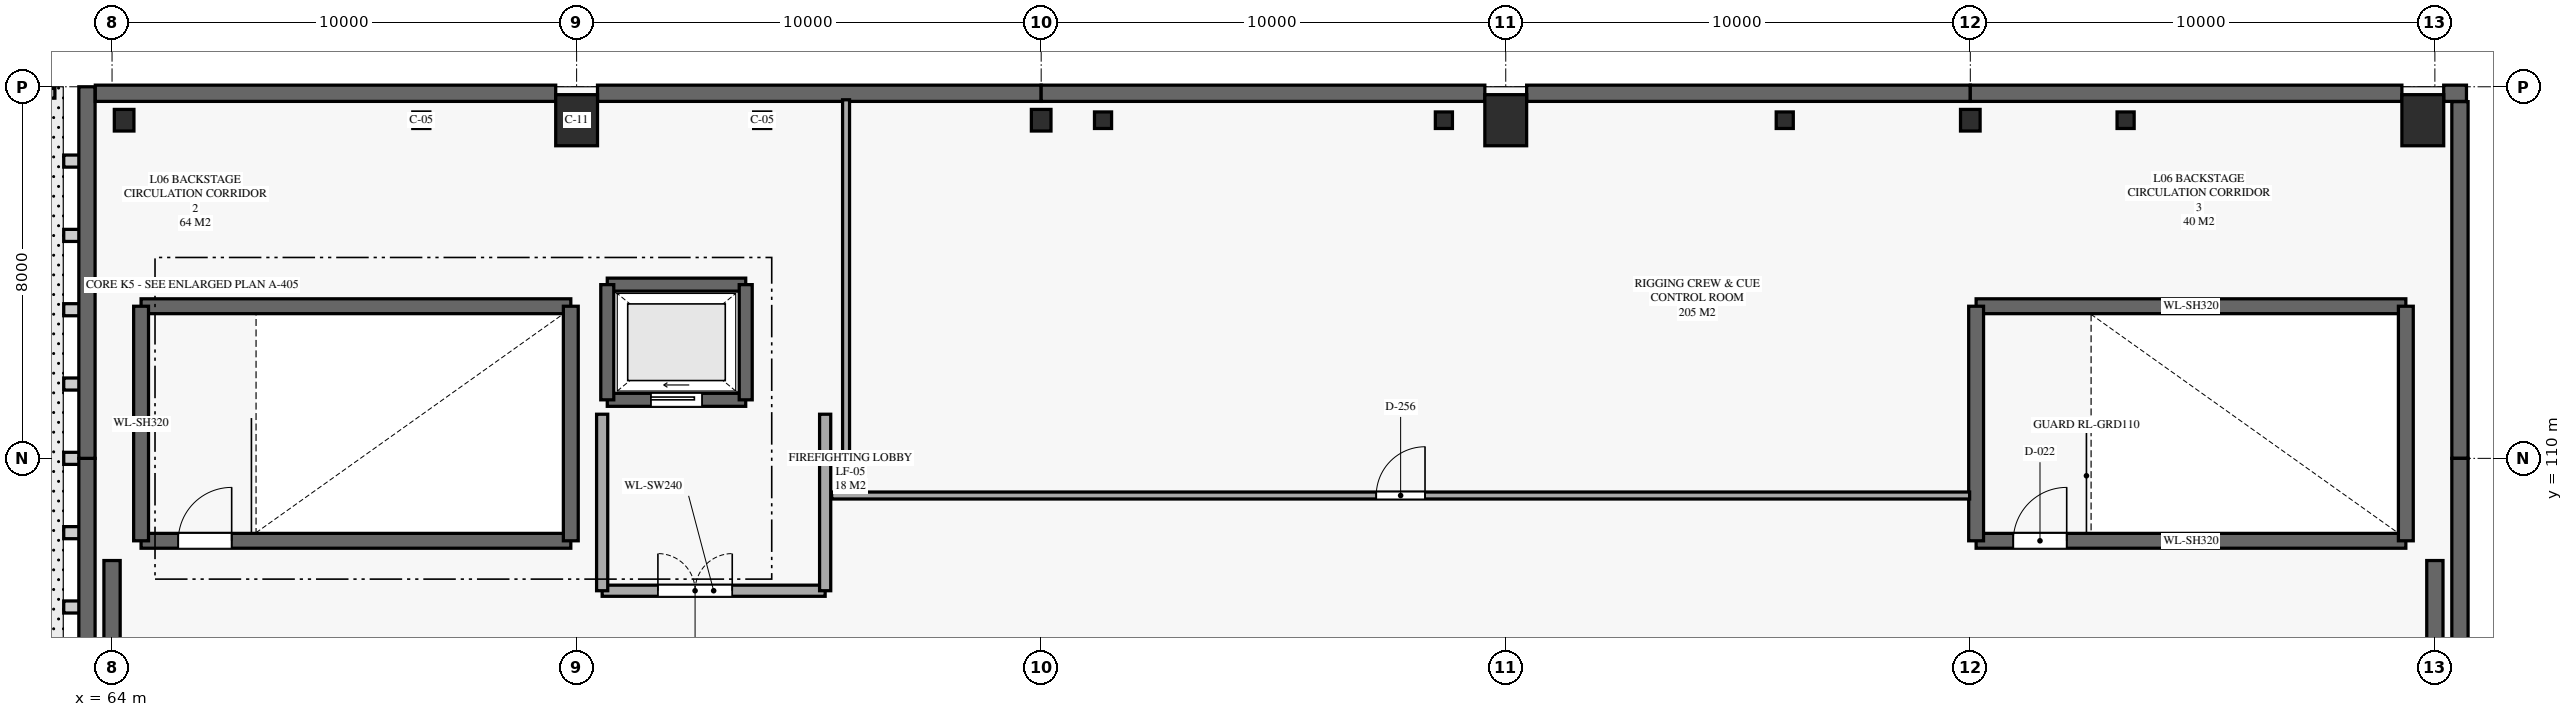
"""IFC4 building model, lengths in metres.
Left out: names, types, materials, properties, quantities, classifications, styles, units other than length and angle.
Written with IfcOpenShell. Run it as: python <this file> out.ifc"""

import sys

from ifc_helpers import new_model, si_unit, direction, frame, frame_2d, origin, origin_2d, place, context, subcontext, project, spatial, rectangle, i_section, extrude, element, fill, save


model = new_model("IFC4")
c1 = context("Model", 3, precision=1e-05, world=origin(), true_north=direction((0.0, 1.0)))
c2 = subcontext(c1, "Body", "Model", "MODEL_VIEW")
j1 = project(units=[si_unit("LENGTHUNIT", "METRE"), si_unit("PLANEANGLEUNIT", "RADIAN")], contexts=[c1])
p1 = place(None, origin())
s1 = spatial("IfcSite", under=j1, at=p1, CompositionType="ELEMENT")
p2 = place(p1, origin())
s2 = spatial("IfcBuilding", under=s1, at=p2, CompositionType="ELEMENT")
p3 = place(p2, frame((0.0, 0.0, 29.6)))
s3 = spatial("IfcBuildingStorey", under=s2, at=p3, CompositionType="ELEMENT", Elevation=29.6)
p4 = place(p3, frame((64.26, 117.28, 0.0), z_axis=(0.0, 0.0, 1.0), x_axis=(1.0, 0.0, 0.0)))
e1 = element("IfcColumn", 1, at=p4, inside=s3, PredefinedType="COLUMN", context=c2, shape_type="SweptSolid", body=[
    extrude(i_section(OverallWidth=0.422, OverallDepth=0.465, WebThickness=0.045, FlangeThickness=0.073, FilletRadius=0.02, at=origin_2d()), origin(), (0.0, 0.0, 1.0), 3.68),
])
p5 = place(p3, frame((74.0, 117.28, 0.0), z_axis=(0.0, 0.0, 1.0), x_axis=(1.0, 0.0, 0.0)))
e2 = element("IfcColumn", 2, at=p5, inside=s3, PredefinedType="COLUMN", context=c2, shape_type="SweptSolid", body=[
    extrude(rectangle(XDim=0.9, YDim=1.1, at=origin_2d()), origin(), (0.0, 0.0, 1.0), 4.6),
])
p6 = place(p3, frame((84.0, 117.28, 0.0), z_axis=(0.0, 0.0, 1.0), x_axis=(1.0, 0.0, 0.0)))
e3 = element("IfcColumn", 3, at=p6, inside=s3, PredefinedType="COLUMN", context=c2, shape_type="SweptSolid", body=[
    extrude(i_section(OverallWidth=0.422, OverallDepth=0.465, WebThickness=0.045, FlangeThickness=0.073, FilletRadius=0.02, at=origin_2d()), origin(), (0.0, 0.0, 1.0), 4.6),
])
p7 = place(p3, frame((94.0, 117.28, 0.0), z_axis=(0.0, 0.0, 1.0), x_axis=(1.0, 0.0, 0.0)))
e4 = element("IfcColumn", 4, at=p7, inside=s3, PredefinedType="COLUMN", context=c2, shape_type="SweptSolid", body=[
    extrude(rectangle(XDim=0.9, YDim=1.1, at=origin_2d()), origin(), (0.0, 0.0, 1.0), 4.6),
])
p8 = place(p3, frame((104.0, 117.28, 0.0), z_axis=(0.0, 0.0, 1.0), x_axis=(1.0, 0.0, 0.0)))
e5 = element("IfcColumn", 5, at=p8, inside=s3, PredefinedType="COLUMN", context=c2, shape_type="SweptSolid", body=[
    extrude(i_section(OverallWidth=0.422, OverallDepth=0.465, WebThickness=0.045, FlangeThickness=0.073, FilletRadius=0.02, at=origin_2d()), origin(), (0.0, 0.0, 1.0), 4.6),
])
p9 = place(p3, frame((113.74, 117.28, 0.0), z_axis=(0.0, 0.0, 1.0), x_axis=(1.0, 0.0, 0.0)))
e6 = element("IfcColumn", 6, at=p9, inside=s3, PredefinedType="COLUMN", context=c2, shape_type="SweptSolid", body=[
    extrude(rectangle(XDim=0.9, YDim=1.1, at=origin_2d()), origin(), (0.0, 0.0, 1.0), 4.25),
])
p10 = place(p3, frame((70.657, 117.28, 2.5), z_axis=(0.0, 0.0, 1.0), x_axis=(1.0, 0.0, 0.0)))
e7 = element("IfcColumn", 7, at=p10, inside=s3, PredefinedType="COLUMN", context=c2, shape_type="SweptSolid", body=[
    extrude(i_section(OverallWidth=0.368, OverallDepth=0.356, WebThickness=0.011, FlangeThickness=0.018, FilletRadius=0.015, at=origin_2d()), origin(), (0.0, 0.0, 1.0), 1.756),
])
p11 = place(p3, frame((77.994, 117.28, 2.5), z_axis=(0.0, 0.0, 1.0), x_axis=(1.0, 0.0, 0.0)))
e8 = element("IfcColumn", 8, at=p11, inside=s3, PredefinedType="COLUMN", context=c2, shape_type="SweptSolid", body=[
    extrude(i_section(OverallWidth=0.368, OverallDepth=0.356, WebThickness=0.011, FlangeThickness=0.018, FilletRadius=0.015, at=origin_2d()), origin(), (0.0, 0.0, 1.0), 1.187),
])
p12 = place(p3, frame((85.332, 117.28, 2.5), z_axis=(0.0, 0.0, 1.0), x_axis=(1.0, 0.0, 0.0)))
e9 = element("IfcColumn", 9, at=p12, inside=s3, PredefinedType="COLUMN", context=c2, shape_type="SweptSolid", body=[
    extrude(i_section(OverallWidth=0.368, OverallDepth=0.356, WebThickness=0.011, FlangeThickness=0.018, FilletRadius=0.015, at=origin_2d()), origin(), (0.0, 0.0, 1.0), 1.756),
])
p13 = place(p3, frame((92.668, 117.28, 2.5), z_axis=(0.0, 0.0, 1.0), x_axis=(1.0, 0.0, 0.0)))
e10 = element("IfcColumn", 10, at=p13, inside=s3, PredefinedType="COLUMN", context=c2, shape_type="SweptSolid", body=[
    extrude(i_section(OverallWidth=0.368, OverallDepth=0.356, WebThickness=0.011, FlangeThickness=0.018, FilletRadius=0.015, at=origin_2d()), origin(), (0.0, 0.0, 1.0), 1.187),
])
p14 = place(p3, frame((100.006, 117.28, 2.5), z_axis=(0.0, 0.0, 1.0), x_axis=(1.0, 0.0, 0.0)))
e11 = element("IfcColumn", 11, at=p14, inside=s3, PredefinedType="COLUMN", context=c2, shape_type="SweptSolid", body=[
    extrude(i_section(OverallWidth=0.368, OverallDepth=0.356, WebThickness=0.011, FlangeThickness=0.018, FilletRadius=0.015, at=origin_2d()), origin(), (0.0, 0.0, 1.0), 1.756),
])
p15 = place(p3, frame((107.343, 117.28, 2.5), z_axis=(0.0, 0.0, 1.0), x_axis=(1.0, 0.0, 0.0)))
e12 = element("IfcColumn", 12, at=p15, inside=s3, PredefinedType="COLUMN", context=c2, shape_type="SweptSolid", body=[
    extrude(i_section(OverallWidth=0.368, OverallDepth=0.356, WebThickness=0.011, FlangeThickness=0.018, FilletRadius=0.015, at=origin_2d()), origin(), (0.0, 0.0, 1.0), 1.187),
])
p16 = place(p3, frame((64.625, 108.225, 0.0), z_axis=(0.0, 0.0, 1.0), x_axis=(1.0, 0.0, 0.0)))
e13 = element("IfcWall", 13, at=p16, inside=s3, PredefinedType="SHEAR", context=c2, shape_type="SweptSolid", body=[
    extrude(rectangle(XDim=9.25, YDim=0.32, at=frame_2d((4.625, 0.0))), origin(), (0.0, 0.0, 1.0), 4.35),
])
p17 = place(p16, frame((0.8, 0.0, 0.0)))
e14 = element("IfcOpeningElement", 14, at=p17, cuts=e13, PredefinedType="OPENING", context=c2, shape_type="SweptSolid", body=[
    extrude(rectangle(XDim=1.15, YDim=2.2, at=frame_2d((0.575, 1.1))), frame((0.0, 0.17, 0.0), z_axis=(0.0, -1.0, 0.0), x_axis=(1.0, 0.0, 0.0)), (0.0, 0.0, 1.0), 0.34),
])
p18 = place(p3, frame((73.875, 113.275, 0.0), z_axis=(0.0, 0.0, 1.0), x_axis=(-1.0, 0.0, 0.0)))
e15 = element("IfcWall", 15, at=p18, inside=s3, PredefinedType="SHEAR", context=c2, shape_type="SweptSolid", body=[
    extrude(rectangle(XDim=9.25, YDim=0.32, at=frame_2d((4.625, 0.0))), origin(), (0.0, 0.0, 1.0), 4.35),
])
p19 = place(p3, frame((64.625, 113.275, 0.0), z_axis=(0.0, 0.0, 1.0), x_axis=(0.0, -1.0, 0.0)))
e16 = element("IfcWall", 16, at=p19, inside=s3, PredefinedType="SHEAR", context=c2, shape_type="SweptSolid", body=[
    extrude(rectangle(XDim=5.05, YDim=0.32, at=frame_2d((2.525, 0.0))), origin(), (0.0, 0.0, 1.0), 4.35),
])
p20 = place(p3, frame((73.875, 108.225, 0.0), z_axis=(0.0, 0.0, 1.0), x_axis=(0.0, 1.0, 0.0)))
e17 = element("IfcWall", 17, at=p20, inside=s3, PredefinedType="SHEAR", context=c2, shape_type="SweptSolid", body=[
    extrude(rectangle(XDim=5.05, YDim=0.32, at=frame_2d((2.525, 0.0))), origin(), (0.0, 0.0, 1.0), 4.38),
])
p21 = place(p3, frame((104.125, 108.225, 0.0), z_axis=(0.0, 0.0, 1.0), x_axis=(1.0, 0.0, 0.0)))
e18 = element("IfcWall", 18, at=p21, inside=s3, PredefinedType="SHEAR", context=c2, shape_type="SweptSolid", body=[
    extrude(rectangle(XDim=9.25, YDim=0.32, at=frame_2d((4.625, 0.0))), origin(), (0.0, 0.0, 1.0), 4.35),
])
p22 = place(p21, frame((0.8, 0.0, 0.0)))
e19 = element("IfcOpeningElement", 19, at=p22, cuts=e18, PredefinedType="OPENING", context=c2, shape_type="SweptSolid", body=[
    extrude(rectangle(XDim=1.15, YDim=2.2, at=frame_2d((0.575, 1.1))), frame((0.0, 0.17, 0.0), z_axis=(0.0, -1.0, 0.0), x_axis=(1.0, 0.0, 0.0)), (0.0, 0.0, 1.0), 0.34),
])
p23 = place(p3, frame((113.375, 113.275, 0.0), z_axis=(0.0, 0.0, 1.0), x_axis=(-1.0, 0.0, 0.0)))
e20 = element("IfcWall", 20, at=p23, inside=s3, PredefinedType="SHEAR", context=c2, shape_type="SweptSolid", body=[
    extrude(rectangle(XDim=9.25, YDim=0.32, at=frame_2d((4.625, 0.0))), origin(), (0.0, 0.0, 1.0), 4.35),
])
p24 = place(p3, frame((104.125, 113.275, 0.0), z_axis=(0.0, 0.0, 1.0), x_axis=(0.0, -1.0, 0.0)))
e21 = element("IfcWall", 21, at=p24, inside=s3, PredefinedType="SHEAR", context=c2, shape_type="SweptSolid", body=[
    extrude(rectangle(XDim=5.05, YDim=0.32, at=frame_2d((2.525, 0.0))), origin(), (0.0, 0.0, 1.0), 4.38),
])
p25 = place(p3, frame((113.375, 108.225, 0.0), z_axis=(0.0, 0.0, 1.0), x_axis=(0.0, 1.0, 0.0)))
e22 = element("IfcWall", 22, at=p25, inside=s3, PredefinedType="SHEAR", context=c2, shape_type="SweptSolid", body=[
    extrude(rectangle(XDim=5.05, YDim=0.32, at=frame_2d((2.525, 0.0))), origin(), (0.0, 0.0, 1.0), 4.35),
])
p26 = place(p3, frame((74.66, 111.26, 0.0), z_axis=(0.0, 0.0, 1.0), x_axis=(1.0, 0.0, 0.0)))
e23 = element("IfcWall", 23, at=p26, inside=s3, PredefinedType="SHEAR", context=c2, shape_type="SweptSolid", body=[
    extrude(rectangle(XDim=2.98, YDim=0.28, at=frame_2d((1.49, 0.0))), origin(), (0.0, 0.0, 1.0), 4.38),
])
p27 = place(p26, frame((0.94, 0.0, 0.0)))
e24 = element("IfcOpeningElement", 24, at=p27, cuts=e23, PredefinedType="OPENING", context=c2, shape_type="SweptSolid", body=[
    extrude(rectangle(XDim=1.1, YDim=2.2, at=frame_2d((0.55, 1.1))), frame((0.0, 0.15, 0.0), z_axis=(0.0, -1.0, 0.0), x_axis=(1.0, 0.0, 0.0)), (0.0, 0.0, 1.0), 0.3),
])
p28 = place(p3, frame((77.64, 113.74, 0.0), z_axis=(0.0, 0.0, 1.0), x_axis=(-1.0, 0.0, 0.0)))
e25 = element("IfcWall", 25, at=p28, inside=s3, PredefinedType="SHEAR", context=c2, shape_type="SweptSolid", body=[
    extrude(rectangle(XDim=2.98, YDim=0.28, at=frame_2d((1.49, 0.0))), origin(), (0.0, 0.0, 1.0), 4.38),
])
for number, where, z_axis, x_axis in (
    (26, (74.66, 113.74, 0.0), (0.0, 0.0, 1.0), (0.0, -1.0, 0.0)),
    (27, (77.64, 111.26, 0.0), (0.0, 0.0, 1.0), (0.0, 1.0, 0.0)),
):
    element("IfcWall", number, at=place(p3, frame(where, z_axis=z_axis, x_axis=x_axis)), inside=s3, PredefinedType="SHEAR", context=c2, shape_type="SweptSolid", body=[
        extrude(rectangle(XDim=2.48, YDim=0.28, at=frame_2d((1.24, 0.0))), origin(), (0.0, 0.0, 1.0), 4.38),
    ])
p29 = place(p3, frame((74.55, 107.15, 0.0), z_axis=(0.0, 0.0, 1.0), x_axis=(1.0, 0.0, 0.0)))
e28 = element("IfcWall", 28, at=p29, inside=s3, PredefinedType="SOLIDWALL", context=c2, shape_type="SweptSolid", body=[
    extrude(rectangle(XDim=4.8, YDim=0.24, at=frame_2d((2.4, 0.0))), origin(), (0.0, 0.0, 1.0), 4.35),
])
p30 = place(p29, frame((1.2, 0.0, 0.0)))
e29 = element("IfcOpeningElement", 29, at=p30, cuts=e28, PredefinedType="OPENING", context=c2, shape_type="SweptSolid", body=[
    extrude(rectangle(XDim=1.6, YDim=2.2, at=frame_2d((0.8, 1.1))), frame((0.0, 0.13, 0.0), z_axis=(0.0, -1.0, 0.0), x_axis=(1.0, 0.0, 0.0)), (0.0, 0.0, 1.0), 0.26),
])
p31 = place(p3, frame((74.55, 110.95, 0.0), z_axis=(0.0, 0.0, 1.0), x_axis=(0.0, -1.0, 0.0)))
e30 = element("IfcWall", 30, at=p31, inside=s3, PredefinedType="SOLIDWALL", context=c2, shape_type="SweptSolid", body=[
    extrude(rectangle(XDim=3.8, YDim=0.24, at=frame_2d((1.9, 0.0))), origin(), (0.0, 0.0, 1.0), 4.38),
])
p32 = place(p3, frame((79.35, 107.15, 0.0), z_axis=(0.0, 0.0, 1.0), x_axis=(0.0, 1.0, 0.0)))
e31 = element("IfcWall", 31, at=p32, inside=s3, PredefinedType="SOLIDWALL", context=c2, shape_type="SweptSolid", body=[
    extrude(rectangle(XDim=3.8, YDim=0.24, at=frame_2d((1.9, 0.0))), origin(), (0.0, 0.0, 1.0), 4.35),
])
p33 = place(p3, frame((64.0, 102.232, 0.0), z_axis=(0.0, 0.0, 1.0), x_axis=(0.0, 1.0, 0.0)))
e32 = element("IfcWall", 32, at=p33, inside=s3, PredefinedType="SHEAR", context=c2, shape_type="SweptSolid", body=[
    extrude(rectangle(XDim=5.568, YDim=0.35, at=frame_2d((2.784, 0.0))), origin(), (0.0, 0.0, 1.0), 4.35),
])
p34 = place(p3, frame((114.0, 102.55, 0.0), z_axis=(0.0, 0.0, 1.0), x_axis=(0.0, 1.0, 0.0)))
e33 = element("IfcWall", 33, at=p34, inside=s3, PredefinedType="SHEAR", context=c2, shape_type="SweptSolid", body=[
    extrude(rectangle(XDim=5.25, YDim=0.35, at=frame_2d((2.625, 0.0))), origin(), (0.0, 0.0, 1.0), 4.35),
])
for number, where, z_axis, x_axis in (
    (34, (63.46, 102.0, 0.0), (0.0, 0.0, 1.0), (0.0, 1.0, 0.0)),
    (35, (63.46, 110.0, 0.0), (0.0, 0.0, 1.0), (0.0, 1.0, 0.0)),
):
    element("IfcWall", number, at=place(p3, frame(where, z_axis=z_axis, x_axis=x_axis)), inside=s3, PredefinedType="SHEAR", context=c2, shape_type="SweptSolid", body=[
        extrude(rectangle(XDim=8.0, YDim=0.35, at=frame_2d((4.0, 0.0))), origin(), (0.0, 0.0, 1.0), 4.35),
    ])
p35 = place(p3, frame((63.64, 117.86, 0.0), z_axis=(0.0, 0.0, 1.0), x_axis=(1.0, 0.0, 0.0)))
e36 = element("IfcWall", 36, at=p35, inside=s3, PredefinedType="SHEAR", context=c2, shape_type="SweptSolid", body=[
    extrude(rectangle(XDim=9.91, YDim=0.35, at=frame_2d((4.955, 0.0))), origin(), (0.0, 0.0, 1.0), 4.35),
])
for number, where, z_axis, x_axis in (
    (37, (74.45, 117.86, 0.0), (0.0, 0.0, 1.0), (1.0, 0.0, 0.0)),
    (38, (84.0, 117.86, 0.0), (0.0, 0.0, 1.0), (1.0, 0.0, 0.0)),
    (39, (94.45, 117.86, 0.0), (0.0, 0.0, 1.0), (1.0, 0.0, 0.0)),
):
    element("IfcWall", number, at=place(p3, frame(where, z_axis=z_axis, x_axis=x_axis)), inside=s3, PredefinedType="SHEAR", context=c2, shape_type="SweptSolid", body=[
        extrude(rectangle(XDim=9.55, YDim=0.35, at=frame_2d((4.775, 0.0))), origin(), (0.0, 0.0, 1.0), 4.35),
    ])
p36 = place(p3, frame((104.0, 117.86, 0.0), z_axis=(0.0, 0.0, 1.0), x_axis=(1.0, 0.0, 0.0)))
e40 = element("IfcWall", 40, at=p36, inside=s3, PredefinedType="SHEAR", context=c2, shape_type="SweptSolid", body=[
    extrude(rectangle(XDim=9.29, YDim=0.35, at=frame_2d((4.645, 0.0))), origin(), (0.0, 0.0, 1.0), 4.35),
])
p37 = place(p3, frame((114.19, 117.86, 0.0), z_axis=(0.0, 0.0, 1.0), x_axis=(1.0, 0.0, 0.0)))
e41 = element("IfcWall", 41, at=p37, inside=s3, PredefinedType="SHEAR", context=c2, shape_type="SweptSolid", body=[
    extrude(rectangle(XDim=0.49, YDim=0.35, at=frame_2d((0.245, 0.0))), origin(), (0.0, 0.0, 1.0), 4.35),
])
p38 = place(p3, frame((114.54, 117.68, 0.0), z_axis=(0.0, 0.0, 1.0), x_axis=(0.0, -1.0, 0.0)))
e42 = element("IfcWall", 42, at=p38, inside=s3, PredefinedType="SHEAR", context=c2, shape_type="SweptSolid", body=[
    extrude(rectangle(XDim=7.68, YDim=0.35, at=frame_2d((3.84, 0.0))), origin(), (0.0, 0.0, 1.0), 4.35),
])
p39 = place(p3, frame((114.54, 110.0, 0.0), z_axis=(0.0, 0.0, 1.0), x_axis=(0.0, -1.0, 0.0)))
e43 = element("IfcWall", 43, at=p39, inside=s3, PredefinedType="SHEAR", context=c2, shape_type="SweptSolid", body=[
    extrude(rectangle(XDim=8.0, YDim=0.35, at=frame_2d((4.0, 0.0))), origin(), (0.0, 0.0, 1.0), 4.35),
])
p40 = place(p3, frame((35.46, 117.86, 0.0), z_axis=(0.0, 0.0, 1.0), x_axis=(1.0, 0.0, 0.0)))
e44 = element("IfcWall", 44, at=p40, inside=s3, PredefinedType="PARAPET", context=c2, shape_type="SweptSolid", body=[
    extrude(rectangle(XDim=27.31, YDim=0.21, at=frame_2d((13.655, 0.0))), origin(), (0.0, 0.0, 1.0), 0.95),
])
p41 = place(p3, frame((79.49, 109.2, 0.0), z_axis=(0.0, 0.0, 1.0), x_axis=(1.0, 0.0, 0.0)))
e45 = element("IfcWall", 45, at=p41, inside=s3, PredefinedType="PARTITIONING", context=c2, shape_type="SweptSolid", body=[
    extrude(rectangle(XDim=24.495, YDim=0.15, at=frame_2d((12.248, 0.0))), origin(), (0.0, 0.0, 1.0), 4.35),
])
p42 = place(p41, frame((11.722, 0.0, 0.0)))
e46 = element("IfcOpeningElement", 46, at=p42, cuts=e45, PredefinedType="OPENING", context=c2, shape_type="SweptSolid", body=[
    extrude(rectangle(XDim=1.05, YDim=2.2, at=frame_2d((0.525, 1.1))), frame((0.0, 0.085, 0.0), z_axis=(0.0, -1.0, 0.0), x_axis=(1.0, 0.0, 0.0)), (0.0, 0.0, 1.0), 0.17),
])
p43 = place(p3, frame((79.8, 117.72, 0.0), z_axis=(0.0, 0.0, 1.0), x_axis=(0.0, -1.0, 0.0)))
e47 = element("IfcWall", 47, at=p43, inside=s3, PredefinedType="PARTITIONING", context=c2, shape_type="SweptSolid", body=[
    extrude(rectangle(XDim=8.37, YDim=0.15, at=frame_2d((4.185, 0.0))), origin(), (0.0, 0.0, 1.0), 4.35),
])
p44 = place(p17, origin())
e48 = element("IfcDoor", 48, at=p44, inside=s3, OperationType="SINGLE_SWING_RIGHT", PredefinedType="DOOR", context=c2, shape_type="SweptSolid", body=[
    extrude(rectangle(XDim=1.15, YDim=2.2, at=frame_2d((0.575, 1.1))), frame((0.0, 0.025, 0.0), z_axis=(0.0, -1.0, 0.0), x_axis=(1.0, 0.0, 0.0)), (0.0, 0.0, 1.0), 0.05),
])
fill(e14, e48)
p45 = place(p22, origin())
e49 = element("IfcDoor", 49, at=p45, inside=s3, OperationType="SINGLE_SWING_RIGHT", PredefinedType="DOOR", context=c2, shape_type="SweptSolid", body=[
    extrude(rectangle(XDim=1.15, YDim=2.2, at=frame_2d((0.575, 1.1))), frame((0.0, 0.025, 0.0), z_axis=(0.0, -1.0, 0.0), x_axis=(1.0, 0.0, 0.0)), (0.0, 0.0, 1.0), 0.05),
])
fill(e19, e49)
p46 = place(p27, origin())
e50 = element("IfcDoor", 50, at=p46, inside=s3, OperationType="SLIDING_TO_LEFT", PredefinedType="DOOR", context=c2, shape_type="SweptSolid", body=[
    extrude(rectangle(XDim=1.1, YDim=2.2, at=frame_2d((0.55, 1.1))), frame((0.0, 0.025, 0.0), z_axis=(0.0, -1.0, 0.0), x_axis=(1.0, 0.0, 0.0)), (0.0, 0.0, 1.0), 0.05),
])
fill(e24, e50)
p47 = place(p30, origin())
e51 = element("IfcDoor", 51, at=p47, inside=s3, OperationType="DOUBLE_DOOR_SINGLE_SWING", PredefinedType="DOOR", context=c2, shape_type="SweptSolid", body=[
    extrude(rectangle(XDim=1.6, YDim=2.2, at=frame_2d((0.8, 1.1))), frame((0.0, 0.025, 0.0), z_axis=(0.0, -1.0, 0.0), x_axis=(1.0, 0.0, 0.0)), (0.0, 0.0, 1.0), 0.05),
])
fill(e29, e51)
p48 = place(p42, origin())
e52 = element("IfcDoor", 52, at=p48, inside=s3, OperationType="SINGLE_SWING_RIGHT", PredefinedType="DOOR", context=c2, shape_type="SweptSolid", body=[
    extrude(rectangle(XDim=1.05, YDim=2.2, at=frame_2d((0.525, 1.1))), frame((0.0, 0.025, 0.0), z_axis=(0.0, -1.0, 0.0), x_axis=(1.0, 0.0, 0.0)), (0.0, 0.0, 1.0), 0.05),
])
fill(e46, e52)
save(model, sys.argv[1])
